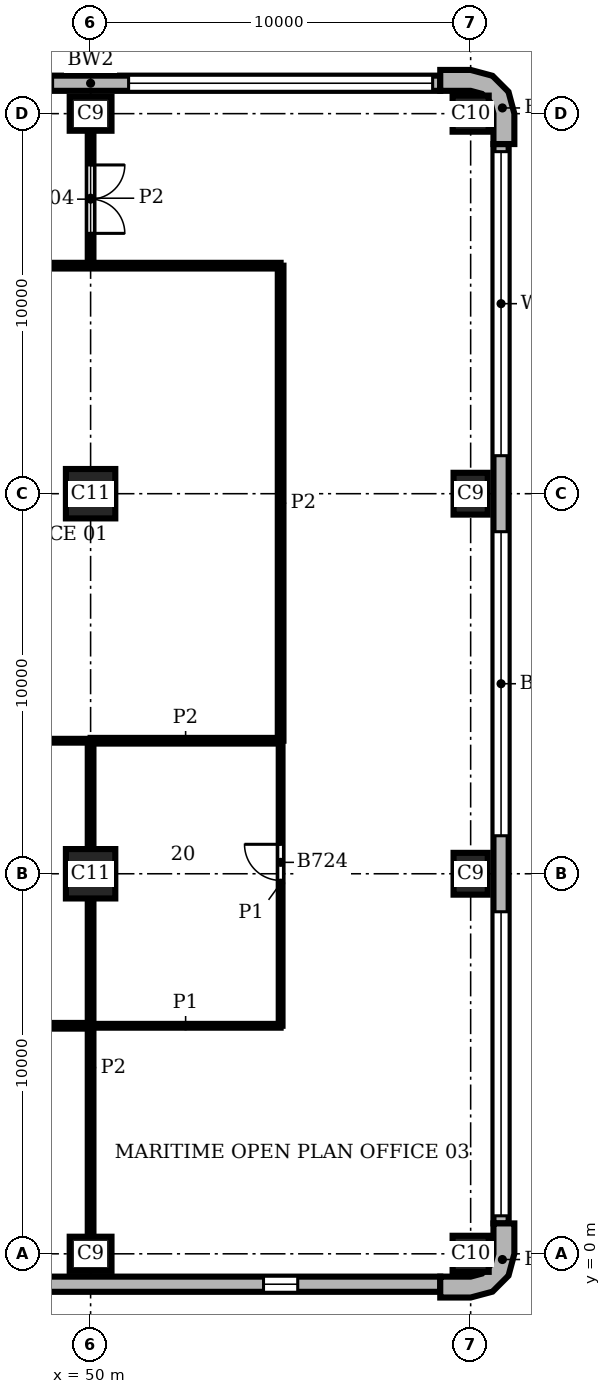
"""IFC4 building model, lengths in metres.
Left out: names, types, materials, properties, quantities, classifications, styles, units other than length and angle.
Written with IfcOpenShell. Run it as: python <this file> out.ifc"""

import sys

from ifc_helpers import new_model, si_unit, direction, frame, frame_2d, origin, origin_2d, place, context, subcontext, project, spatial, polyline, rectangle, outline, extrude, element, fill, save


model = new_model("IFC4")
c1 = context("Model", 3, precision=1e-05, world=origin(), true_north=direction((0.0, 1.0)))
c2 = subcontext(c1, "Body", "Model", "MODEL_VIEW")
j1 = project(units=[si_unit("LENGTHUNIT", "METRE"), si_unit("PLANEANGLEUNIT", "RADIAN")], contexts=[c1])
p1 = place(None, origin())
s1 = spatial("IfcSite", under=j1, at=p1, CompositionType="ELEMENT")
p2 = place(p1, origin())
s2 = spatial("IfcBuilding", under=s1, at=p2, CompositionType="ELEMENT")
p3 = place(p2, frame((0.0, 0.0, 205.8)))
s3 = spatial("IfcBuildingStorey", under=s2, at=p3, CompositionType="ELEMENT", Elevation=205.8)
p4 = place(p3, frame((50.0, 0.0, 0.0), z_axis=(0.0, 0.0, 1.0), x_axis=(1.0, 0.0, 0.0)))
e1 = element("IfcColumn", 1, at=p4, inside=s3, PredefinedType="COLUMN", context=c2, shape_type="SweptSolid", body=[
    extrude(rectangle(XDim=1.1, YDim=0.9, at=origin_2d()), origin(), (0.0, 0.0, 1.0), 3.9),
])
p5 = place(p3, frame((60.0, 0.0, 0.0), z_axis=(0.0, 0.0, 1.0), x_axis=(1.0, 0.0, 0.0)))
e2 = element("IfcColumn", 2, at=p5, inside=s3, PredefinedType="COLUMN", context=c2, shape_type="SweptSolid", body=[
    extrude(rectangle(XDim=0.95, YDim=0.95, at=origin_2d()), origin(), (0.0, 0.0, 1.0), 3.9),
])
for number, where, z_axis, x_axis in (
    (3, (60.0, 10.0, 0.0), (0.0, 0.0, 1.0), (0.0, 1.0, 0.0)),
    (4, (60.0, 20.0, 0.0), (0.0, 0.0, 1.0), (0.0, 1.0, 0.0)),
):
    element("IfcColumn", number, at=place(p3, frame(where, z_axis=z_axis, x_axis=x_axis)), inside=s3, PredefinedType="COLUMN", context=c2, shape_type="SweptSolid", body=[
        extrude(rectangle(XDim=1.1, YDim=0.9, at=origin_2d()), origin(), (0.0, 0.0, 1.0), 3.9),
    ])
p6 = place(p3, frame((60.0, 30.0, 0.0), z_axis=(0.0, 0.0, 1.0), x_axis=(1.0, 0.0, 0.0)))
e5 = element("IfcColumn", 5, at=p6, inside=s3, PredefinedType="COLUMN", context=c2, shape_type="SweptSolid", body=[
    extrude(rectangle(XDim=0.95, YDim=0.95, at=origin_2d()), origin(), (0.0, 0.0, 1.0), 3.9),
])
p7 = place(p3, frame((50.0, 30.0, 0.0), z_axis=(0.0, 0.0, 1.0), x_axis=(1.0, 0.0, 0.0)))
e6 = element("IfcColumn", 6, at=p7, inside=s3, PredefinedType="COLUMN", context=c2, shape_type="SweptSolid", body=[
    extrude(rectangle(XDim=1.1, YDim=0.9, at=origin_2d()), origin(), (0.0, 0.0, 1.0), 3.9),
])
for number, where, z_axis, x_axis in (
    (7, (50.0, 10.0, 0.0), (0.0, 0.0, 1.0), (1.0, 0.0, 0.0)),
    (8, (50.0, 20.0, 0.0), (0.0, 0.0, 1.0), (1.0, 0.0, 0.0)),
):
    element("IfcColumn", number, at=place(p3, frame(where, z_axis=z_axis, x_axis=x_axis)), inside=s3, PredefinedType="COLUMN", context=c2, shape_type="SweptSolid", body=[
        extrude(rectangle(XDim=1.3, YDim=1.3, at=origin_2d()), origin(), (0.0, 0.0, 1.0), 3.9),
    ])
p8 = place(p3, origin())
e9 = element("IfcWall", 9, at=p8, inside=s3, PredefinedType="SOLIDWALL", context=c2, shape_type="SweptSolid", body=[
    extrude(outline(polyline([(59.2, -1.0), (59.2, -1.15), (60.0, -1.15), (60.575, -0.996), (60.996, -0.575), (61.15, 0.0), (61.15, 0.8), (61.0, 0.8), (60.6, 0.8), (60.6, 0.0), (60.52, -0.3), (60.3, -0.52), (60.0, -0.6), (59.2, -0.6), (59.2, -1.0)])), origin(), (0.0, 0.0, 1.0), 3.9),
])
e10 = element("IfcWall", 10, at=p8, inside=s3, PredefinedType="SOLIDWALL", context=c2, shape_type="SweptSolid", body=[
    extrude(outline(polyline([(61.0, 29.2), (61.15, 29.2), (61.15, 30.0), (60.996, 30.575), (60.575, 30.996), (60.0, 31.15), (59.2, 31.15), (59.2, 31.0), (59.2, 30.6), (60.0, 30.6), (60.3, 30.52), (60.52, 30.3), (60.6, 30.0), (60.6, 29.2), (61.0, 29.2)])), origin(), (0.0, 0.0, 1.0), 3.9),
])
p9 = place(p3, frame((20.8, -0.8, 0.0), z_axis=(0.0, 0.0, 1.0), x_axis=(1.0, 0.0, 0.0)))
e11 = element("IfcWall", 11, at=p9, inside=s3, PredefinedType="SOLIDWALL", context=c2, shape_type="SweptSolid", body=[
    extrude(rectangle(XDim=38.4, YDim=0.4, at=frame_2d((19.2, 0.0))), origin(), (0.0, 0.0, 1.0), 3.9),
])
p10 = place(p9, frame((3.75, 0.0, 0.9)))
e12 = element("IfcOpeningElement", 12, at=p10, cuts=e11, PredefinedType="OPENING", context=c2, shape_type="SweptSolid", body=[
    extrude(rectangle(XDim=0.9, YDim=2.35, at=frame_2d((0.45, 1.175))), frame((0.0, 0.21, 0.0), z_axis=(0.0, -1.0, 0.0), x_axis=(1.0, 0.0, 0.0)), (0.0, 0.0, 1.0), 0.42),
])
p11 = place(p9, frame((13.75, 0.0, 0.9)))
e13 = element("IfcOpeningElement", 13, at=p11, cuts=e11, PredefinedType="OPENING", context=c2, shape_type="SweptSolid", body=[
    extrude(rectangle(XDim=0.9, YDim=2.35, at=frame_2d((0.45, 1.175))), frame((0.0, 0.21, 0.0), z_axis=(0.0, -1.0, 0.0), x_axis=(1.0, 0.0, 0.0)), (0.0, 0.0, 1.0), 0.42),
])
p12 = place(p9, frame((23.75, 0.0, 0.9)))
e14 = element("IfcOpeningElement", 14, at=p12, cuts=e11, PredefinedType="OPENING", context=c2, shape_type="SweptSolid", body=[
    extrude(rectangle(XDim=0.9, YDim=2.35, at=frame_2d((0.45, 1.175))), frame((0.0, 0.21, 0.0), z_axis=(0.0, -1.0, 0.0), x_axis=(1.0, 0.0, 0.0)), (0.0, 0.0, 1.0), 0.42),
])
p13 = place(p9, frame((33.75, 0.0, 0.9)))
e15 = element("IfcOpeningElement", 15, at=p13, cuts=e11, PredefinedType="OPENING", context=c2, shape_type="SweptSolid", body=[
    extrude(rectangle(XDim=0.9, YDim=2.35, at=frame_2d((0.45, 1.175))), frame((0.0, 0.21, 0.0), z_axis=(0.0, -1.0, 0.0), x_axis=(1.0, 0.0, 0.0)), (0.0, 0.0, 1.0), 0.42),
])
p14 = place(p3, frame((60.8, 0.8, 0.0), z_axis=(0.0, 0.0, 1.0), x_axis=(0.0, 1.0, 0.0)))
e16 = element("IfcWall", 16, at=p14, inside=s3, PredefinedType="SOLIDWALL", context=c2, shape_type="SweptSolid", body=[
    extrude(rectangle(XDim=28.4, YDim=0.4, at=frame_2d((14.2, 0.0))), origin(), (0.0, 0.0, 1.0), 3.9),
])
p15 = place(p14, frame((0.2, 0.0, 0.9)))
e17 = element("IfcOpeningElement", 17, at=p15, cuts=e16, PredefinedType="OPENING", context=c2, shape_type="SweptSolid", body=[
    extrude(rectangle(XDim=8.0, YDim=2.35, at=frame_2d((4.0, 1.175))), frame((0.0, 0.21, 0.0), z_axis=(0.0, -1.0, 0.0), x_axis=(1.0, 0.0, 0.0)), (0.0, 0.0, 1.0), 0.42),
])
p16 = place(p14, frame((10.2, 0.0, 0.9)))
e18 = element("IfcOpeningElement", 18, at=p16, cuts=e16, PredefinedType="OPENING", context=c2, shape_type="SweptSolid", body=[
    extrude(rectangle(XDim=8.0, YDim=2.35, at=frame_2d((4.0, 1.175))), frame((0.0, 0.21, 0.0), z_axis=(0.0, -1.0, 0.0), x_axis=(1.0, 0.0, 0.0)), (0.0, 0.0, 1.0), 0.42),
])
p17 = place(p14, frame((20.2, 0.0, 0.9)))
e19 = element("IfcOpeningElement", 19, at=p17, cuts=e16, PredefinedType="OPENING", context=c2, shape_type="SweptSolid", body=[
    extrude(rectangle(XDim=8.0, YDim=2.35, at=frame_2d((4.0, 1.175))), frame((0.0, 0.21, 0.0), z_axis=(0.0, -1.0, 0.0), x_axis=(1.0, 0.0, 0.0)), (0.0, 0.0, 1.0), 0.42),
])
p18 = place(p3, frame((59.2, 30.8, 0.0), z_axis=(0.0, 0.0, 1.0), x_axis=(-1.0, 0.0, 0.0)))
e20 = element("IfcWall", 20, at=p18, inside=s3, PredefinedType="SOLIDWALL", context=c2, shape_type="SweptSolid", body=[
    extrude(rectangle(XDim=18.4, YDim=0.4, at=frame_2d((9.2, 0.0))), origin(), (0.0, 0.0, 1.0), 3.9),
])
p19 = place(p18, frame((0.2, 0.0, 0.9)))
e21 = element("IfcOpeningElement", 21, at=p19, cuts=e20, PredefinedType="OPENING", context=c2, shape_type="SweptSolid", body=[
    extrude(rectangle(XDim=8.0, YDim=2.35, at=frame_2d((4.0, 1.175))), frame((0.0, 0.21, 0.0), z_axis=(0.0, -1.0, 0.0), x_axis=(1.0, 0.0, 0.0)), (0.0, 0.0, 1.0), 0.42),
])
p20 = place(p18, frame((10.2, 0.0, 0.9)))
e22 = element("IfcOpeningElement", 22, at=p20, cuts=e20, PredefinedType="OPENING", context=c2, shape_type="SweptSolid", body=[
    extrude(rectangle(XDim=8.0, YDim=2.35, at=frame_2d((4.0, 1.175))), frame((0.0, 0.21, 0.0), z_axis=(0.0, -1.0, 0.0), x_axis=(1.0, 0.0, 0.0)), (0.0, 0.0, 1.0), 0.42),
])
p21 = place(p3, frame((55.0, 6.0, 0.0), z_axis=(0.0, 0.0, 1.0), x_axis=(0.0, 1.0, 0.0)))
e23 = element("IfcWall", 23, at=p21, inside=s3, PredefinedType="PARTITIONING", context=c2, shape_type="SweptSolid", body=[
    extrude(rectangle(XDim=7.5, YDim=0.1, at=frame_2d((3.75, 0.0))), origin(), (0.0, 0.0, 1.0), 3.58),
])
p22 = place(p21, frame((3.825, 0.0, 0.0)))
e24 = element("IfcOpeningElement", 24, at=p22, cuts=e23, PredefinedType="OPENING", context=c2, shape_type="SweptSolid", body=[
    extrude(rectangle(XDim=0.95, YDim=2.1, at=frame_2d((0.475, 1.05))), frame((0.0, 0.06, 0.0), z_axis=(0.0, -1.0, 0.0), x_axis=(1.0, 0.0, 0.0)), (0.0, 0.0, 1.0), 0.12),
])
p23 = place(p3, frame((50.0, 6.0, 0.0), z_axis=(0.0, 0.0, 1.0), x_axis=(1.0, 0.0, 0.0)))
e25 = element("IfcWall", 25, at=p23, inside=s3, PredefinedType="PARTITIONING", context=c2, shape_type="SweptSolid", body=[
    extrude(rectangle(XDim=5.0, YDim=0.1, at=frame_2d((2.5, 0.0))), origin(), (0.0, 0.0, 1.0), 3.58),
])
p24 = place(p3, frame((45.0, 13.5, 0.0), z_axis=(0.0, 0.0, 1.0), x_axis=(1.0, 0.0, 0.0)))
e26 = element("IfcWall", 26, at=p24, inside=s3, PredefinedType="PARTITIONING", context=c2, shape_type="SweptSolid", body=[
    extrude(rectangle(XDim=5.0, YDim=0.1, at=frame_2d((2.5, 0.0))), origin(), (0.0, 0.0, 1.0), 3.58),
])
p25 = place(p24, frame((2.35, 0.0, 0.0)))
e27 = element("IfcOpeningElement", 27, at=p25, cuts=e26, PredefinedType="OPENING", context=c2, shape_type="SweptSolid", body=[
    extrude(rectangle(XDim=0.9, YDim=2.1, at=frame_2d((0.45, 1.05))), frame((0.0, 0.06, 0.0), z_axis=(0.0, -1.0, 0.0), x_axis=(1.0, 0.0, 0.0)), (0.0, 0.0, 1.0), 0.12),
])
p26 = place(p3, frame((50.0, 0.45, 0.0), z_axis=(0.0, 0.0, 1.0), x_axis=(0.0, 1.0, 0.0)))
e28 = element("IfcWall", 28, at=p26, inside=s3, PredefinedType="PARTITIONING", context=c2, shape_type="SweptSolid", body=[
    extrude(rectangle(XDim=8.9, YDim=0.15, at=frame_2d((4.45, 0.0))), origin(), (0.0, 0.0, 1.0), 3.58),
])
p27 = place(p3, frame((50.0, 10.65, 0.0), z_axis=(0.0, 0.0, 1.0), x_axis=(0.0, 1.0, 0.0)))
e29 = element("IfcWall", 29, at=p27, inside=s3, PredefinedType="PARTITIONING", context=c2, shape_type="SweptSolid", body=[
    extrude(rectangle(XDim=2.85, YDim=0.15, at=frame_2d((1.425, 0.0))), origin(), (0.0, 0.0, 1.0), 3.58),
])
p28 = place(p3, frame((50.0, 26.0, 0.0), z_axis=(0.0, 0.0, 1.0), x_axis=(0.0, 1.0, 0.0)))
e30 = element("IfcWall", 30, at=p28, inside=s3, PredefinedType="PARTITIONING", context=c2, shape_type="SweptSolid", body=[
    extrude(rectangle(XDim=3.55, YDim=0.15, at=frame_2d((1.775, 0.0))), origin(), (0.0, 0.0, 1.0), 3.58),
])
p29 = place(p28, frame((0.85, 0.0, 0.0)))
e31 = element("IfcOpeningElement", 31, at=p29, cuts=e30, PredefinedType="OPENING", context=c2, shape_type="SweptSolid", body=[
    extrude(rectangle(XDim=1.8, YDim=2.1, at=frame_2d((0.9, 1.05))), frame((0.0, 0.085, 0.0), z_axis=(0.0, -1.0, 0.0), x_axis=(1.0, 0.0, 0.0)), (0.0, 0.0, 1.0), 0.17),
])
p30 = place(p3, frame((55.0, 13.5, 0.0), z_axis=(0.0, 0.0, 1.0), x_axis=(0.0, 1.0, 0.0)))
e32 = element("IfcWall", 32, at=p30, inside=s3, PredefinedType="PARTITIONING", context=c2, shape_type="SweptSolid", body=[
    extrude(rectangle(XDim=12.5, YDim=0.15, at=frame_2d((6.25, 0.0))), origin(), (0.0, 0.0, 1.0), 3.58),
])
p31 = place(p3, frame((38.0, 6.0, 0.0), z_axis=(0.0, 0.0, 1.0), x_axis=(1.0, 0.0, 0.0)))
e33 = element("IfcWall", 33, at=p31, inside=s3, PredefinedType="PARTITIONING", context=c2, shape_type="SweptSolid", body=[
    extrude(rectangle(XDim=12.0, YDim=0.15, at=frame_2d((6.0, 0.0))), origin(), (0.0, 0.0, 1.0), 3.58),
])
p32 = place(p3, frame((50.0, 13.5, 0.0), z_axis=(0.0, 0.0, 1.0), x_axis=(1.0, 0.0, 0.0)))
e34 = element("IfcWall", 34, at=p32, inside=s3, PredefinedType="PARTITIONING", context=c2, shape_type="SweptSolid", body=[
    extrude(rectangle(XDim=5.0, YDim=0.15, at=frame_2d((2.5, 0.0))), origin(), (0.0, 0.0, 1.0), 3.58),
])
p33 = place(p3, frame((33.2, 26.0, 0.0), z_axis=(0.0, 0.0, 1.0), x_axis=(1.0, 0.0, 0.0)))
e35 = element("IfcWall", 35, at=p33, inside=s3, PredefinedType="PARTITIONING", context=c2, shape_type="SweptSolid", body=[
    extrude(rectangle(XDim=21.8, YDim=0.15, at=frame_2d((10.9, 0.0))), origin(), (0.0, 0.0, 1.0), 3.58),
])
p34 = place(p33, frame((10.15, 0.0, 0.0)))
e36 = element("IfcOpeningElement", 36, at=p34, cuts=e35, PredefinedType="OPENING", context=c2, shape_type="SweptSolid", body=[
    extrude(rectangle(XDim=1.8, YDim=2.1, at=frame_2d((0.9, 1.05))), frame((0.0, 0.085, 0.0), z_axis=(0.0, -1.0, 0.0), x_axis=(1.0, 0.0, 0.0)), (0.0, 0.0, 1.0), 0.17),
])
p35 = place(p13, origin())
e37 = element("IfcWindow", 37, at=p35, inside=s3, PartitioningType="SINGLE_PANEL", PredefinedType="WINDOW", context=c2, shape_type="SweptSolid", body=[
    extrude(rectangle(XDim=0.9, YDim=2.35, at=frame_2d((0.45, 1.175))), frame((0.0, 0.16, 0.0), z_axis=(0.0, -1.0, 0.0), x_axis=(1.0, 0.0, 0.0)), (0.0, 0.0, 1.0), 0.06),
])
fill(e15, e37)
p36 = place(p15, origin())
e38 = element("IfcWindow", 38, at=p36, inside=s3, PartitioningType="SINGLE_PANEL", PredefinedType="WINDOW", context=c2, shape_type="SweptSolid", body=[
    extrude(rectangle(XDim=8.0, YDim=2.35, at=frame_2d((4.0, 1.175))), frame((0.0, 0.16, 0.0), z_axis=(0.0, -1.0, 0.0), x_axis=(1.0, 0.0, 0.0)), (0.0, 0.0, 1.0), 0.06),
])
fill(e17, e38)
p37 = place(p16, origin())
e39 = element("IfcWindow", 39, at=p37, inside=s3, PartitioningType="SINGLE_PANEL", PredefinedType="WINDOW", context=c2, shape_type="SweptSolid", body=[
    extrude(rectangle(XDim=8.0, YDim=2.35, at=frame_2d((4.0, 1.175))), frame((0.0, 0.16, 0.0), z_axis=(0.0, -1.0, 0.0), x_axis=(1.0, 0.0, 0.0)), (0.0, 0.0, 1.0), 0.06),
])
fill(e18, e39)
p38 = place(p17, origin())
e40 = element("IfcWindow", 40, at=p38, inside=s3, PartitioningType="SINGLE_PANEL", PredefinedType="WINDOW", context=c2, shape_type="SweptSolid", body=[
    extrude(rectangle(XDim=8.0, YDim=2.35, at=frame_2d((4.0, 1.175))), frame((0.0, 0.16, 0.0), z_axis=(0.0, -1.0, 0.0), x_axis=(1.0, 0.0, 0.0)), (0.0, 0.0, 1.0), 0.06),
])
fill(e19, e40)
p39 = place(p19, origin())
e41 = element("IfcWindow", 41, at=p39, inside=s3, PartitioningType="SINGLE_PANEL", PredefinedType="WINDOW", context=c2, shape_type="SweptSolid", body=[
    extrude(rectangle(XDim=8.0, YDim=2.35, at=frame_2d((4.0, 1.175))), frame((0.0, 0.16, 0.0), z_axis=(0.0, -1.0, 0.0), x_axis=(1.0, 0.0, 0.0)), (0.0, 0.0, 1.0), 0.06),
])
fill(e21, e41)
p40 = place(p29, frame((1.8, 0.0, 0.0), z_axis=(0.0, 0.0, 1.0), x_axis=(-1.0, 0.0, 0.0)))
e42 = element("IfcDoor", 42, at=p40, inside=s3, OperationType="DOUBLE_DOOR_SINGLE_SWING", PredefinedType="DOOR", context=c2, shape_type="SweptSolid", body=[
    extrude(rectangle(XDim=1.8, YDim=2.1, at=frame_2d((0.9, 1.05))), frame((0.0, 0.025, 0.0), z_axis=(0.0, -1.0, 0.0), x_axis=(1.0, 0.0, 0.0)), (0.0, 0.0, 1.0), 0.05),
])
fill(e31, e42)
p41 = place(p22, origin())
e43 = element("IfcDoor", 43, at=p41, inside=s3, OperationType="SINGLE_SWING_RIGHT", PredefinedType="DOOR", context=c2, shape_type="SweptSolid", body=[
    extrude(rectangle(XDim=0.95, YDim=2.1, at=frame_2d((0.475, 1.05))), frame((0.0, 0.025, 0.0), z_axis=(0.0, -1.0, 0.0), x_axis=(1.0, 0.0, 0.0)), (0.0, 0.0, 1.0), 0.05),
])
fill(e24, e43)
save(model, sys.argv[1])
